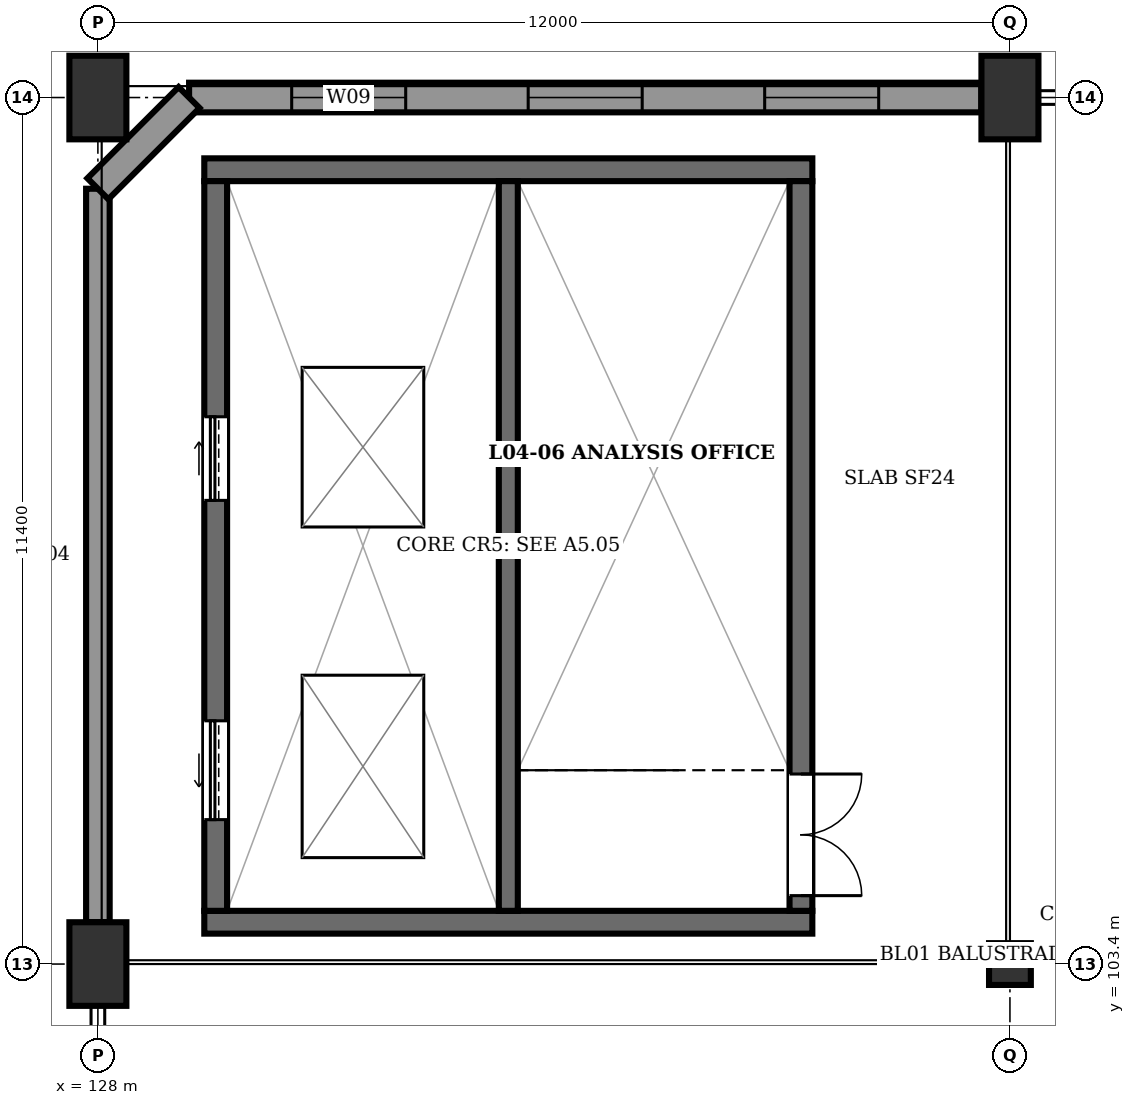
"""IFC4 building model, lengths in metres.
Left out: names, types, materials, properties, quantities, classifications, styles, units other than length and angle.
Written with IfcOpenShell. Run it as: python <this file> out.ifc"""

import sys

from ifc_helpers import new_model, si_unit, direction, frame, frame_2d, origin, origin_2d, place, context, subcontext, project, spatial, rectangle, extrude, element, fill, save


model = new_model("IFC4")
c1 = context("Model", 3, precision=1e-05, world=origin(), true_north=direction((0.0, 1.0)))
c2 = subcontext(c1, "Body", "Model", "MODEL_VIEW")
j1 = project(units=[si_unit("LENGTHUNIT", "METRE"), si_unit("PLANEANGLEUNIT", "RADIAN")], contexts=[c1])
p1 = place(None, origin())
s1 = spatial("IfcSite", under=j1, at=p1, CompositionType="ELEMENT")
p2 = place(p1, origin())
s2 = spatial("IfcBuilding", under=s1, at=p2, CompositionType="ELEMENT")
p3 = place(p2, frame((0.0, 0.0, 19.2)))
s3 = spatial("IfcBuildingStorey", under=s2, at=p3, CompositionType="ELEMENT", Elevation=19.2)
p4 = place(p3, frame((128.0, 103.4, 0.0), z_axis=(0.0, 0.0, 1.0), x_axis=(1.0, 0.0, 0.0)))
e1 = element("IfcColumn", 1, at=p4, inside=s3, PredefinedType="COLUMN", context=c2, shape_type="SweptSolid", body=[
    extrude(rectangle(XDim=0.75, YDim=1.1, at=origin_2d()), origin(), (0.0, 0.0, 1.0), 6.453),
])
p5 = place(p3, frame((128.0, 114.8, 0.0), z_axis=(0.0, 0.0, 1.0), x_axis=(1.0, 0.0, 0.0)))
e2 = element("IfcColumn", 2, at=p5, inside=s3, PredefinedType="COLUMN", context=c2, shape_type="SweptSolid", body=[
    extrude(rectangle(XDim=0.75, YDim=1.1, at=origin_2d()), origin(), (0.0, 0.0, 1.0), 7.65),
])
p6 = place(p3, frame((140.0, 103.4, 0.0), z_axis=(0.0, 0.0, 1.0), x_axis=(1.0, 0.0, 0.0)))
e3 = element("IfcColumn", 3, at=p6, inside=s3, PredefinedType="COLUMN", context=c2, shape_type="SweptSolid", body=[
    extrude(rectangle(XDim=0.55, YDim=0.55, at=origin_2d()), origin(), (0.0, 0.0, 1.0), 3.4),
])
p7 = place(p3, frame((140.0, 114.8, 0.0), z_axis=(0.0, 0.0, 1.0), x_axis=(1.0, 0.0, 0.0)))
e4 = element("IfcColumn", 4, at=p7, inside=s3, PredefinedType="COLUMN", context=c2, shape_type="SweptSolid", body=[
    extrude(rectangle(XDim=0.75, YDim=1.1, at=origin_2d()), origin(), (0.0, 0.0, 1.0), 7.65),
])
p8 = place(p3, frame((128.0, 103.952, 0.0), z_axis=(0.0, 0.0, 1.0), x_axis=(0.0, 1.0, 0.0)))
e5 = element("IfcWall", 5, at=p8, inside=s3, PredefinedType="STANDARD", context=c2, shape_type="SweptSolid", body=[
    extrude(rectangle(XDim=9.648, YDim=0.31, at=frame_2d((4.824, 0.0))), origin(), (0.0, 0.0, 1.0), 2.612),
])
p9 = place(p3, frame((129.2, 114.8, 0.0), z_axis=(0.0, 0.0, 1.0), x_axis=(1.0, 0.0, 0.0)))
e6 = element("IfcWall", 6, at=p9, inside=s3, PredefinedType="STANDARD", context=c2, shape_type="SweptSolid", body=[
    extrude(rectangle(XDim=10.423, YDim=0.39, at=frame_2d((5.211, 0.0))), origin(), (0.0, 0.0, 1.0), 3.1),
])
p10 = place(p9, frame((1.35, 0.0, 0.75)))
e7 = element("IfcOpeningElement", 7, at=p10, cuts=e6, PredefinedType="OPENING", context=c2, shape_type="SweptSolid", body=[
    extrude(rectangle(XDim=1.5, YDim=2.05, at=frame_2d((0.75, 1.025))), frame((0.0, 0.207, 0.0), z_axis=(0.0, -1.0, 0.0), x_axis=(1.0, 0.0, 0.0)), (0.0, 0.0, 1.0), 0.414),
])
p11 = place(p9, frame((4.461, 0.0, 0.75)))
e8 = element("IfcOpeningElement", 8, at=p11, cuts=e6, PredefinedType="OPENING", context=c2, shape_type="SweptSolid", body=[
    extrude(rectangle(XDim=1.5, YDim=2.05, at=frame_2d((0.75, 1.025))), frame((0.0, 0.207, 0.0), z_axis=(0.0, -1.0, 0.0), x_axis=(1.0, 0.0, 0.0)), (0.0, 0.0, 1.0), 0.414),
])
p12 = place(p9, frame((7.573, 0.0, 0.75)))
e9 = element("IfcOpeningElement", 9, at=p12, cuts=e6, PredefinedType="OPENING", context=c2, shape_type="SweptSolid", body=[
    extrude(rectangle(XDim=1.5, YDim=2.05, at=frame_2d((0.75, 1.025))), frame((0.0, 0.207, 0.0), z_axis=(0.0, -1.0, 0.0), x_axis=(1.0, 0.0, 0.0)), (0.0, 0.0, 1.0), 0.414),
])
p13 = place(p3, frame((128.0, 113.6, 0.0), z_axis=(0.0, 0.0, 1.0), x_axis=(0.707106781187, 0.707106781187, 0.0)))
e10 = element("IfcWall", 10, at=p13, inside=s3, PredefinedType="STANDARD", context=c2, shape_type="SweptSolid", body=[
    extrude(rectangle(XDim=1.697, YDim=0.39, at=frame_2d((0.849, 0.0))), origin(), (0.0, 0.0, 1.0), 2.612),
])
for number, where, z_axis, x_axis in (
    (11, (129.4, 103.95, 0.0), (0.0, 0.0, 1.0), (1.0, 0.0, 0.0)),
    (12, (129.4, 113.85, 0.0), (0.0, 0.0, 1.0), (1.0, 0.0, 0.0)),
):
    element("IfcWall", number, at=place(p3, frame(where, z_axis=z_axis, x_axis=x_axis)), inside=s3, PredefinedType="SHEAR", context=c2, shape_type="SweptSolid", body=[
        extrude(rectangle(XDim=8.0, YDim=0.3, at=frame_2d((4.0, 0.0))), origin(), (0.0, 0.0, 1.0), 2.36),
    ])
p14 = place(p3, frame((129.55, 104.1, 0.0), z_axis=(0.0, 0.0, 1.0), x_axis=(0.0, 1.0, 0.0)))
e13 = element("IfcWall", 13, at=p14, inside=s3, PredefinedType="SHEAR", context=c2, shape_type="SweptSolid", body=[
    extrude(rectangle(XDim=9.6, YDim=0.3, at=frame_2d((4.8, 0.0))), origin(), (0.0, 0.0, 1.0), 2.36),
])
p15 = place(p14, frame((1.2, 0.0, 0.0)))
e14 = element("IfcOpeningElement", 14, at=p15, cuts=e13, PredefinedType="OPENING", context=c2, shape_type="SweptSolid", body=[
    extrude(rectangle(XDim=1.3, YDim=2.2, at=frame_2d((0.65, 1.1))), frame((0.0, 0.162, 0.0), z_axis=(0.0, -1.0, 0.0), x_axis=(1.0, 0.0, 0.0)), (0.0, 0.0, 1.0), 0.324),
])
p16 = place(p14, frame((5.4, 0.0, 0.0)))
e15 = element("IfcOpeningElement", 15, at=p16, cuts=e13, PredefinedType="OPENING", context=c2, shape_type="SweptSolid", body=[
    extrude(rectangle(XDim=1.1, YDim=2.2, at=frame_2d((0.55, 1.1))), frame((0.0, 0.162, 0.0), z_axis=(0.0, -1.0, 0.0), x_axis=(1.0, 0.0, 0.0)), (0.0, 0.0, 1.0), 0.324),
])
p17 = place(p3, frame((137.25, 104.1, 0.0), z_axis=(0.0, 0.0, 1.0), x_axis=(0.0, 1.0, 0.0)))
e16 = element("IfcWall", 16, at=p17, inside=s3, PredefinedType="SHEAR", context=c2, shape_type="SweptSolid", body=[
    extrude(rectangle(XDim=9.6, YDim=0.3, at=frame_2d((4.8, 0.0))), origin(), (0.0, 0.0, 1.0), 2.36),
])
p18 = place(p17, frame((0.2, 0.0, 0.0)))
e17 = element("IfcOpeningElement", 17, at=p18, cuts=e16, PredefinedType="OPENING", context=c2, shape_type="SweptSolid", body=[
    extrude(rectangle(XDim=1.6, YDim=2.2, at=frame_2d((0.8, 1.1))), frame((0.0, 0.162, 0.0), z_axis=(0.0, -1.0, 0.0), x_axis=(1.0, 0.0, 0.0)), (0.0, 0.0, 1.0), 0.324),
])
p19 = place(p3, frame((133.4, 104.1, 0.0), z_axis=(0.0, 0.0, 1.0), x_axis=(0.0, 1.0, 0.0)))
e18 = element("IfcWall", 18, at=p19, inside=s3, PredefinedType="SHEAR", context=c2, shape_type="SweptSolid", body=[
    extrude(rectangle(XDim=9.6, YDim=0.25, at=frame_2d((4.8, 0.0))), origin(), (0.0, 0.0, 1.0), 2.36),
])
p20 = place(p10, origin())
e19 = element("IfcWindow", 19, at=p20, inside=s3, PartitioningType="DOUBLE_PANEL_VERTICAL", PredefinedType="WINDOW", context=c2, shape_type="SweptSolid", body=[
    extrude(rectangle(XDim=1.5, YDim=2.05, at=frame_2d((0.75, 1.025))), frame((0.0, 0.08, 0.0), z_axis=(0.0, -1.0, 0.0), x_axis=(1.0, 0.0, 0.0)), (0.0, 0.0, 1.0), 0.06),
])
fill(e7, e19)
p21 = place(p11, origin())
e20 = element("IfcWindow", 20, at=p21, inside=s3, PartitioningType="DOUBLE_PANEL_VERTICAL", PredefinedType="WINDOW", context=c2, shape_type="SweptSolid", body=[
    extrude(rectangle(XDim=1.5, YDim=2.05, at=frame_2d((0.75, 1.025))), frame((0.0, 0.08, 0.0), z_axis=(0.0, -1.0, 0.0), x_axis=(1.0, 0.0, 0.0)), (0.0, 0.0, 1.0), 0.06),
])
fill(e8, e20)
p22 = place(p12, origin())
e21 = element("IfcWindow", 21, at=p22, inside=s3, PartitioningType="DOUBLE_PANEL_VERTICAL", PredefinedType="WINDOW", context=c2, shape_type="SweptSolid", body=[
    extrude(rectangle(XDim=1.5, YDim=2.05, at=frame_2d((0.75, 1.025))), frame((0.0, 0.08, 0.0), z_axis=(0.0, -1.0, 0.0), x_axis=(1.0, 0.0, 0.0)), (0.0, 0.0, 1.0), 0.06),
])
fill(e9, e21)
p23 = place(p2, frame((0.0, 0.0, 27.0)))
p24 = place(p23, frame((0.0, 0.0, -4.64)))
p25 = place(p24, frame((134.0, 109.0, 0.0)))
p26 = place(p25, frame((0.0, 0.0, 0.19)))
e22 = element("IfcWindow", 22, at=p26, inside=s3, PartitioningType="SINGLE_PANEL", PredefinedType="LIGHTDOME", context=c2, shape_type="SweptSolid", body=[
    extrude(rectangle(XDim=1.6, YDim=1.6, at=origin_2d()), origin(), (0.0, 0.0, 1.0), 0.05),
])
p27 = place(p18, frame((1.6, 0.0, 0.0), z_axis=(0.0, 0.0, 1.0), x_axis=(-1.0, 0.0, 0.0)))
e23 = element("IfcDoor", 23, at=p27, inside=s3, OperationType="DOUBLE_DOOR_SINGLE_SWING", PredefinedType="DOOR", context=c2, shape_type="SweptSolid", body=[
    extrude(rectangle(XDim=1.6, YDim=2.2, at=frame_2d((0.8, 1.1))), frame((0.0, 0.025, 0.0), z_axis=(0.0, -1.0, 0.0), x_axis=(1.0, 0.0, 0.0)), (0.0, 0.0, 1.0), 0.05),
])
fill(e17, e23)
p28 = place(p15, origin())
e24 = element("IfcDoor", 24, at=p28, inside=s3, OperationType="SLIDING_TO_LEFT", PredefinedType="DOOR", context=c2, shape_type="SweptSolid", body=[
    extrude(rectangle(XDim=1.3, YDim=2.2, at=frame_2d((0.65, 1.1))), frame((0.0, 0.025, 0.0), z_axis=(0.0, -1.0, 0.0), x_axis=(1.0, 0.0, 0.0)), (0.0, 0.0, 1.0), 0.05),
])
fill(e14, e24)
p29 = place(p16, origin())
e25 = element("IfcDoor", 25, at=p29, inside=s3, OperationType="SLIDING_TO_RIGHT", PredefinedType="DOOR", context=c2, shape_type="SweptSolid", body=[
    extrude(rectangle(XDim=1.1, YDim=2.2, at=frame_2d((0.55, 1.1))), frame((0.0, 0.025, 0.0), z_axis=(0.0, -1.0, 0.0), x_axis=(1.0, 0.0, 0.0)), (0.0, 0.0, 1.0), 0.05),
])
fill(e15, e25)
save(model, sys.argv[1])
